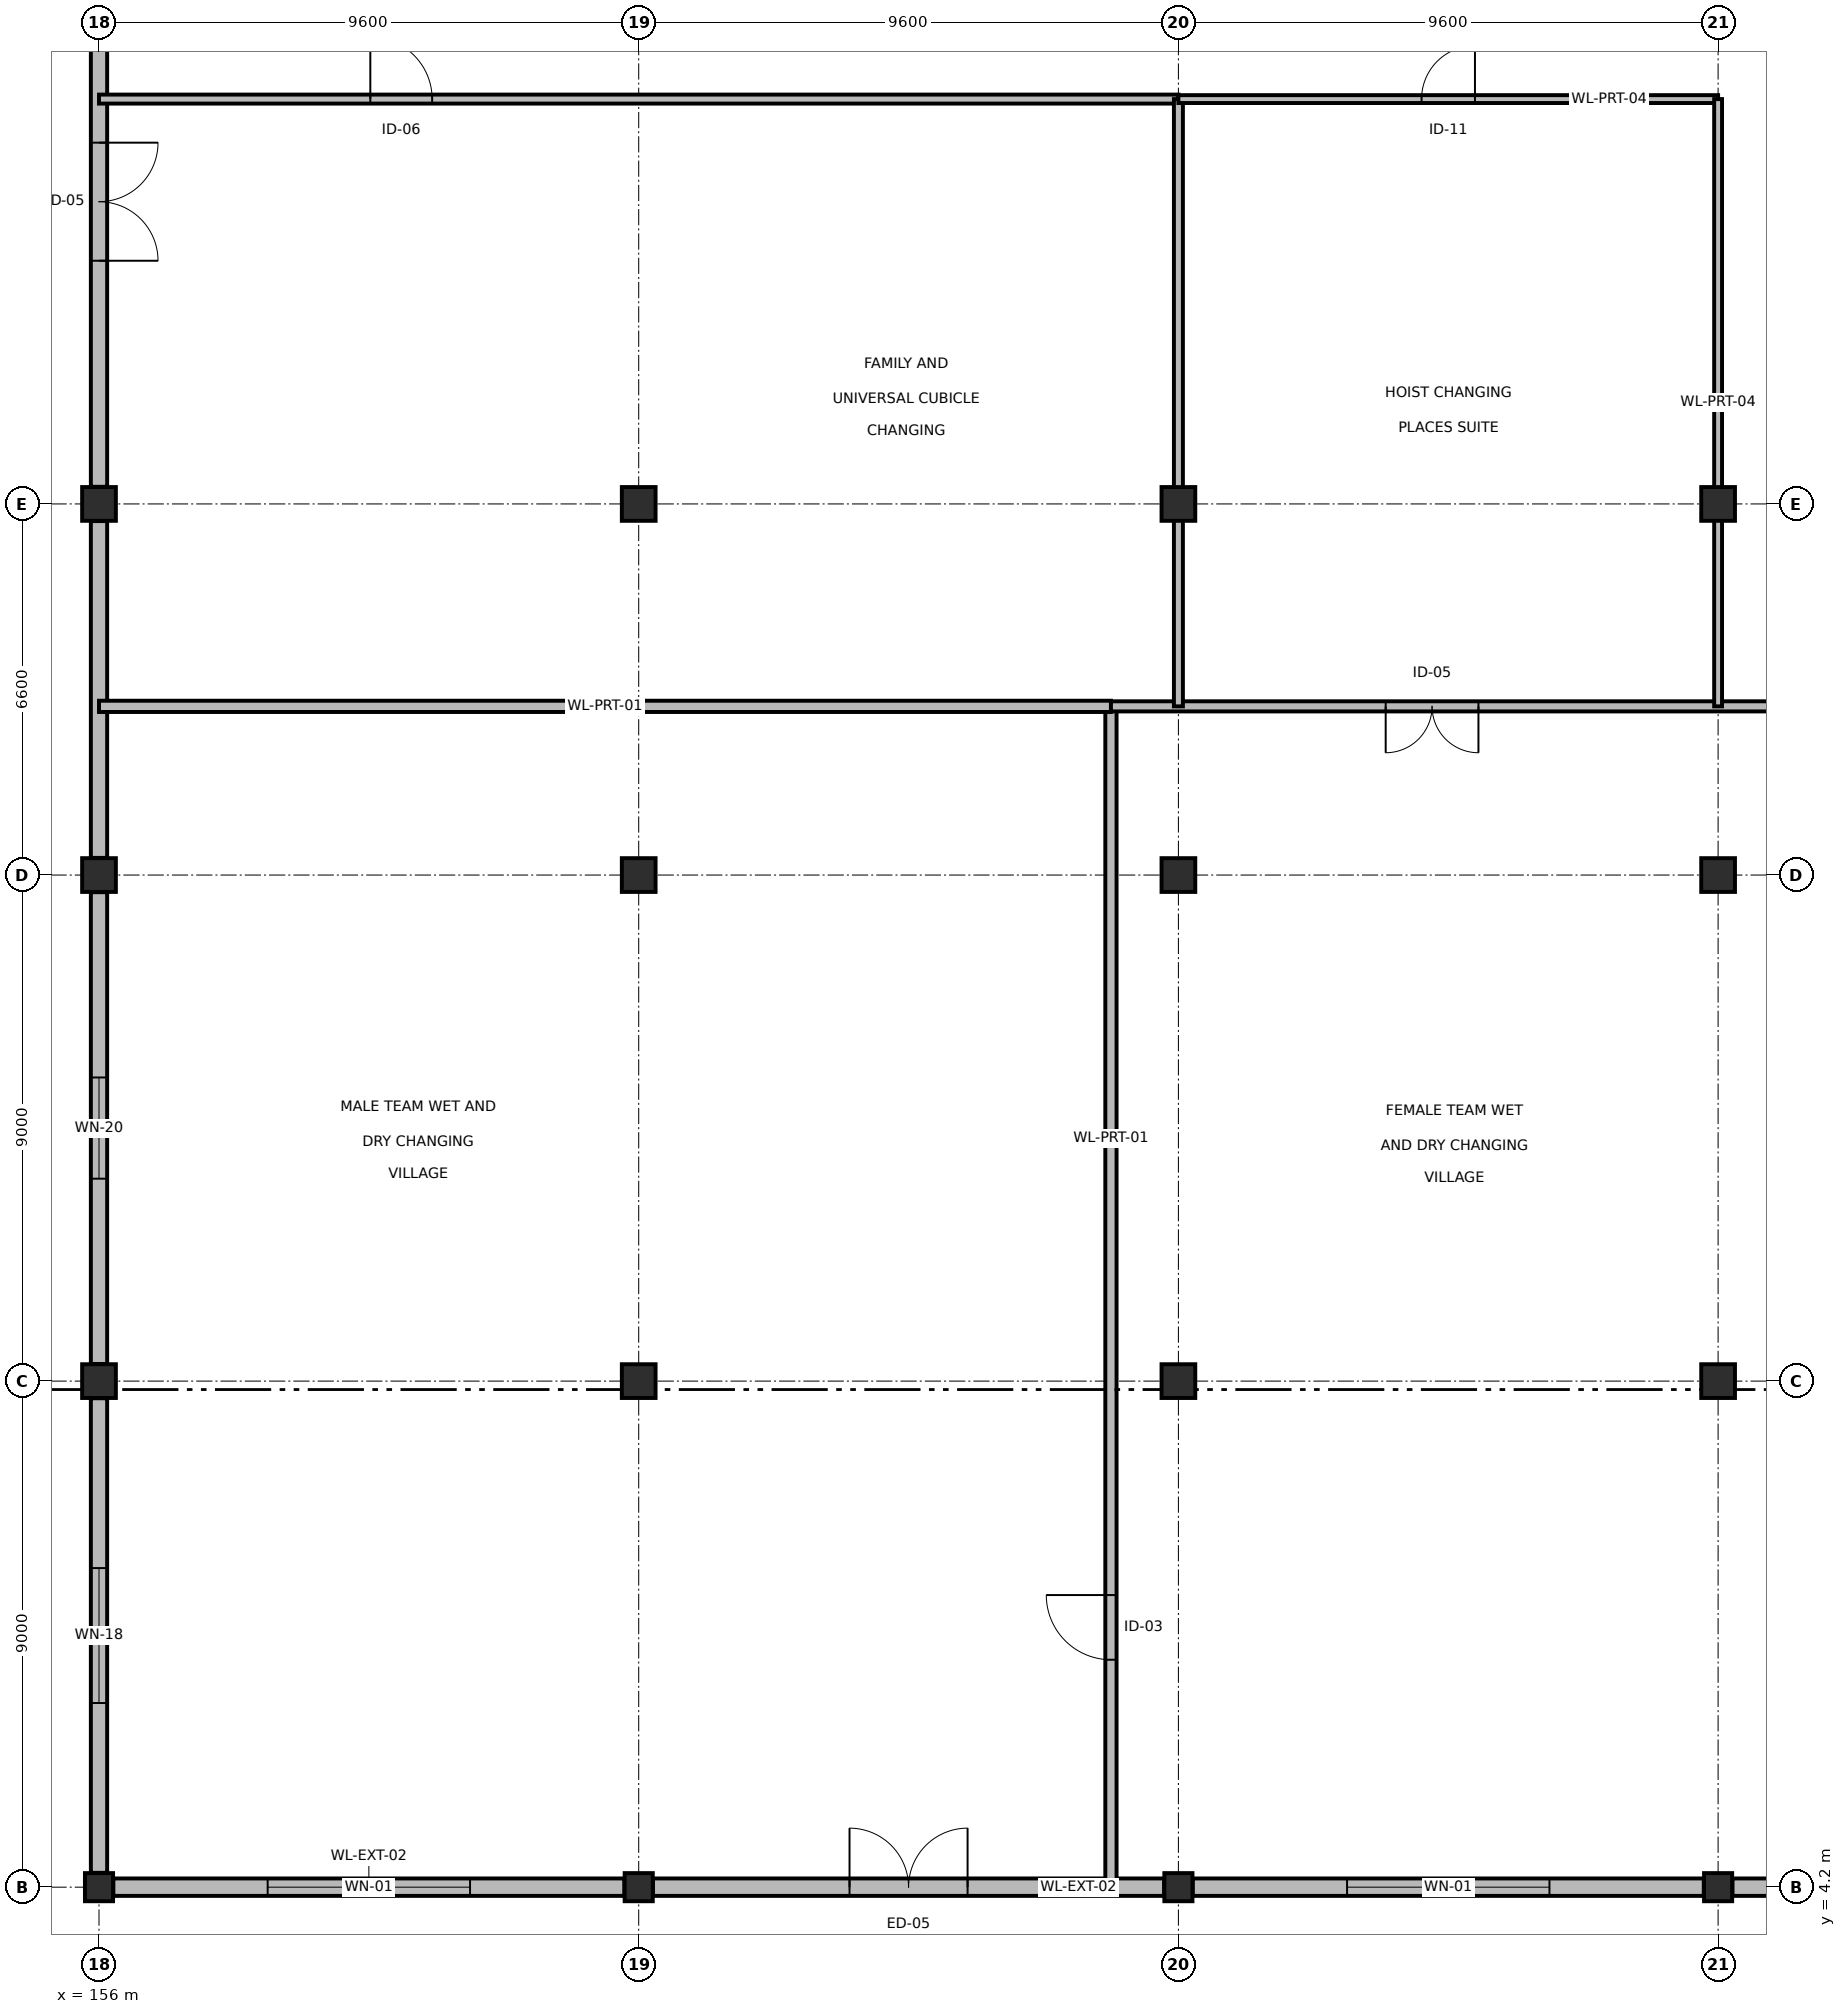
"""IFC4 building model, lengths in metres.
Left out: names, types, materials, properties, quantities, classifications, styles, units other than length and angle.
Written with IfcOpenShell. Run it as: python <this file> out.ifc"""

import sys

from ifc_helpers import new_model, si_unit, direction, frame, frame_2d, origin, origin_2d, place, context, subcontext, project, spatial, rectangle, extrude, element, fill, save


model = new_model("IFC4")
c1 = context("Model", 3, precision=1e-05, world=origin(), true_north=direction((0.0, 1.0)))
c2 = subcontext(c1, "Body", "Model", "MODEL_VIEW")
j1 = project(units=[si_unit("LENGTHUNIT", "METRE"), si_unit("PLANEANGLEUNIT", "RADIAN")], contexts=[c1])
p1 = place(None, origin())
s1 = spatial("IfcSite", under=j1, at=p1, CompositionType="ELEMENT")
p2 = place(p1, origin())
s2 = spatial("IfcBuilding", under=s1, at=p2, CompositionType="ELEMENT")
p3 = place(p2, origin())
s3 = spatial("IfcBuildingStorey", under=s2, at=p3, CompositionType="ELEMENT", Elevation=0.0)
for number, where, z_axis, x_axis in (
    (1, (156.0, 13.2, 0.0), (0.0, 0.0, 1.0), (1.0, 0.0, 0.0)),
    (2, (156.0, 22.2, 0.0), (0.0, 0.0, 1.0), (1.0, 0.0, 0.0)),
    (3, (156.0, 28.8, 0.0), (0.0, 0.0, 1.0), (1.0, 0.0, 0.0)),
    (4, (165.6, 13.2, 0.0), (0.0, 0.0, 1.0), (1.0, 0.0, 0.0)),
    (5, (165.6, 22.2, 0.0), (0.0, 0.0, 1.0), (1.0, 0.0, 0.0)),
    (6, (165.6, 28.8, 0.0), (0.0, 0.0, 1.0), (1.0, 0.0, 0.0)),
    (7, (175.2, 13.2, 0.0), (0.0, 0.0, 1.0), (1.0, 0.0, 0.0)),
    (8, (175.2, 22.2, 0.0), (0.0, 0.0, 1.0), (1.0, 0.0, 0.0)),
    (9, (175.2, 28.8, 0.0), (0.0, 0.0, 1.0), (1.0, 0.0, 0.0)),
    (10, (184.8, 13.2, 0.0), (0.0, 0.0, 1.0), (1.0, 0.0, 0.0)),
    (11, (184.8, 22.2, 0.0), (0.0, 0.0, 1.0), (1.0, 0.0, 0.0)),
    (12, (184.8, 28.8, 0.0), (0.0, 0.0, 1.0), (1.0, 0.0, 0.0)),
):
    element("IfcColumn", number, at=place(p3, frame(where, z_axis=z_axis, x_axis=x_axis)), inside=s3, PredefinedType="COLUMN", context=c2, shape_type="SweptSolid", body=[
        extrude(rectangle(XDim=0.6, YDim=0.6, at=origin_2d()), origin(), (0.0, 0.0, 1.0), 4.8),
    ])
for number, where, z_axis, x_axis in (
    (13, (156.0, 4.2, 0.0), (0.0, 0.0, 1.0), (1.0, 0.0, 0.0)),
    (14, (165.6, 4.2, 0.0), (0.0, 0.0, 1.0), (1.0, 0.0, 0.0)),
    (15, (175.2, 4.2, 0.0), (0.0, 0.0, 1.0), (1.0, 0.0, 0.0)),
    (16, (184.8, 4.2, 0.0), (0.0, 0.0, 1.0), (1.0, 0.0, 0.0)),
):
    element("IfcColumn", number, at=place(p3, frame(where, z_axis=z_axis, x_axis=x_axis)), inside=s3, PredefinedType="COLUMN", context=c2, shape_type="SweptSolid", body=[
        extrude(rectangle(XDim=0.5, YDim=0.5, at=origin_2d()), origin(), (0.0, 0.0, 1.0), 4.8),
    ])
p4 = place(p3, frame((165.345, 4.2, 0.0), z_axis=(0.0, 0.0, 1.0), x_axis=(-1.0, 0.0, 0.0)))
e17 = element("IfcWall", 17, at=p4, inside=s3, PredefinedType="SOLIDWALL", context=c2, shape_type="SweptSolid", body=[
    extrude(rectangle(XDim=9.09, YDim=0.31, at=frame_2d((4.545, 0.0))), origin(), (0.0, 0.0, 1.0), 3.825),
])
p5 = place(p4, frame((2.745, 0.0, 2.2)))
e18 = element("IfcOpeningElement", 18, at=p5, cuts=e17, PredefinedType="OPENING", context=c2, shape_type="SweptSolid", body=[
    extrude(rectangle(XDim=3.6, YDim=0.9, at=frame_2d((1.8, 0.45))), frame((0.0, 0.165, 0.0), z_axis=(0.0, -1.0, 0.0), x_axis=(1.0, 0.0, 0.0)), (0.0, 0.0, 1.0), 0.33),
])
p6 = place(p3, frame((174.945, 4.2, 0.0), z_axis=(0.0, 0.0, 1.0), x_axis=(-1.0, 0.0, 0.0)))
e19 = element("IfcWall", 19, at=p6, inside=s3, PredefinedType="SOLIDWALL", context=c2, shape_type="SweptSolid", body=[
    extrude(rectangle(XDim=9.09, YDim=0.31, at=frame_2d((4.545, 0.0))), origin(), (0.0, 0.0, 1.0), 3.825),
])
p7 = place(p6, frame((3.495, 0.0, 0.0)))
e20 = element("IfcOpeningElement", 20, at=p7, cuts=e19, PredefinedType="OPENING", context=c2, shape_type="SweptSolid", body=[
    extrude(rectangle(XDim=2.1, YDim=2.4, at=frame_2d((1.05, 1.2))), frame((0.0, 0.165, 0.0), z_axis=(0.0, -1.0, 0.0), x_axis=(1.0, 0.0, 0.0)), (0.0, 0.0, 1.0), 0.33),
])
p8 = place(p3, frame((184.545, 4.2, 0.0), z_axis=(0.0, 0.0, 1.0), x_axis=(-1.0, 0.0, 0.0)))
e21 = element("IfcWall", 21, at=p8, inside=s3, PredefinedType="SOLIDWALL", context=c2, shape_type="SweptSolid", body=[
    extrude(rectangle(XDim=9.09, YDim=0.31, at=frame_2d((4.545, 0.0))), origin(), (0.0, 0.0, 1.0), 3.825),
])
p9 = place(p8, frame((2.745, 0.0, 2.2)))
e22 = element("IfcOpeningElement", 22, at=p9, cuts=e21, PredefinedType="OPENING", context=c2, shape_type="SweptSolid", body=[
    extrude(rectangle(XDim=3.6, YDim=0.9, at=frame_2d((1.8, 0.45))), frame((0.0, 0.165, 0.0), z_axis=(0.0, -1.0, 0.0), x_axis=(1.0, 0.0, 0.0)), (0.0, 0.0, 1.0), 0.33),
])
p10 = place(p3, frame((194.145, 4.2, 0.0), z_axis=(0.0, 0.0, 1.0), x_axis=(-1.0, 0.0, 0.0)))
e23 = element("IfcWall", 23, at=p10, inside=s3, PredefinedType="SOLIDWALL", context=c2, shape_type="SweptSolid", body=[
    extrude(rectangle(XDim=9.09, YDim=0.31, at=frame_2d((4.545, 0.0))), origin(), (0.0, 0.0, 1.0), 3.825),
])
p11 = place(p10, frame((3.495, 0.0, 0.0)))
e24 = element("IfcOpeningElement", 24, at=p11, cuts=e23, PredefinedType="OPENING", context=c2, shape_type="SweptSolid", body=[
    extrude(rectangle(XDim=2.1, YDim=2.4, at=frame_2d((1.05, 1.2))), frame((0.0, 0.165, 0.0), z_axis=(0.0, -1.0, 0.0), x_axis=(1.0, 0.0, 0.0)), (0.0, 0.0, 1.0), 0.33),
])
p12 = place(p3, frame((156.0, 4.455, 0.0), z_axis=(0.0, 0.0, 1.0), x_axis=(0.0, 1.0, 0.0)))
e25 = element("IfcWall", 25, at=p12, inside=s3, PredefinedType="SOLIDWALL", context=c2, shape_type="SweptSolid", body=[
    extrude(rectangle(XDim=8.44, YDim=0.29, at=frame_2d((4.22, 0.0))), origin(), (0.0, 0.0, 1.0), 3.825),
])
p13 = place(p12, frame((3.02, 0.0, 0.85)))
e26 = element("IfcOpeningElement", 26, at=p13, cuts=e25, PredefinedType="OPENING", context=c2, shape_type="SweptSolid", body=[
    extrude(rectangle(XDim=2.4, YDim=1.8, at=frame_2d((1.2, 0.9))), frame((0.0, 0.155, 0.0), z_axis=(0.0, -1.0, 0.0), x_axis=(1.0, 0.0, 0.0)), (0.0, 0.0, 1.0), 0.31),
])
p14 = place(p3, frame((156.0, 13.505, 0.0), z_axis=(0.0, 0.0, 1.0), x_axis=(0.0, 1.0, 0.0)))
e27 = element("IfcWall", 27, at=p14, inside=s3, PredefinedType="SOLIDWALL", context=c2, shape_type="SweptSolid", body=[
    extrude(rectangle(XDim=8.39, YDim=0.29, at=frame_2d((4.195, 0.0))), origin(), (0.0, 0.0, 1.0), 3.825),
])
p15 = place(p14, frame((3.295, 0.0, 0.85)))
e28 = element("IfcOpeningElement", 28, at=p15, cuts=e27, PredefinedType="OPENING", context=c2, shape_type="SweptSolid", body=[
    extrude(rectangle(XDim=1.8, YDim=1.8, at=frame_2d((0.9, 0.9))), frame((0.0, 0.155, 0.0), z_axis=(0.0, -1.0, 0.0), x_axis=(1.0, 0.0, 0.0)), (0.0, 0.0, 1.0), 0.31),
])
p16 = place(p3, frame((156.0, 22.505, 0.0), z_axis=(0.0, 0.0, 1.0), x_axis=(0.0, 1.0, 0.0)))
e29 = element("IfcWall", 29, at=p16, inside=s3, PredefinedType="SOLIDWALL", context=c2, shape_type="SweptSolid", body=[
    extrude(rectangle(XDim=5.99, YDim=0.29, at=frame_2d((2.995, 0.0))), origin(), (0.0, 0.0, 1.0), 3.825),
])
p17 = place(p3, frame((156.0, 29.105, 0.0), z_axis=(0.0, 0.0, 1.0), x_axis=(0.0, 1.0, 0.0)))
e30 = element("IfcWall", 30, at=p17, inside=s3, PredefinedType="SOLIDWALL", context=c2, shape_type="SweptSolid", body=[
    extrude(rectangle(XDim=10.14, YDim=0.29, at=frame_2d((5.07, 0.0))), origin(), (0.0, 0.0, 1.0), 3.825),
])
p18 = place(p17, frame((4.02, 0.0, 0.0)))
e31 = element("IfcOpeningElement", 31, at=p18, cuts=e30, PredefinedType="OPENING", context=c2, shape_type="SweptSolid", body=[
    extrude(rectangle(XDim=2.1, YDim=2.4, at=frame_2d((1.05, 1.2))), frame((0.0, 0.155, 0.0), z_axis=(0.0, -1.0, 0.0), x_axis=(1.0, 0.0, 0.0)), (0.0, 0.0, 1.0), 0.31),
])
p19 = place(p3, frame((174.0, 4.2, 0.0), z_axis=(0.0, 0.0, 1.0), x_axis=(0.0, 1.0, 0.0)))
e32 = element("IfcWall", 32, at=p19, inside=s3, PredefinedType="PARTITIONING", context=c2, shape_type="SweptSolid", body=[
    extrude(rectangle(XDim=21.0, YDim=0.2, at=frame_2d((10.5, 0.0))), origin(), (0.0, 0.0, 1.0), 3.825),
])
p20 = place(p19, frame((4.045, 0.0, 0.0)))
e33 = element("IfcOpeningElement", 33, at=p20, cuts=e32, PredefinedType="OPENING", context=c2, shape_type="SweptSolid", body=[
    extrude(rectangle(XDim=1.15, YDim=2.2, at=frame_2d((0.575, 1.1))), frame((0.0, 0.11, 0.0), z_axis=(0.0, -1.0, 0.0), x_axis=(1.0, 0.0, 0.0)), (0.0, 0.0, 1.0), 0.22),
])
p21 = place(p3, frame((156.0, 25.2, 0.0), z_axis=(0.0, 0.0, 1.0), x_axis=(1.0, 0.0, 0.0)))
e34 = element("IfcWall", 34, at=p21, inside=s3, PredefinedType="PARTITIONING", context=c2, shape_type="SweptSolid", body=[
    extrude(rectangle(XDim=18.0, YDim=0.2, at=frame_2d((9.0, 0.0))), origin(), (0.0, 0.0, 1.0), 3.825),
])
p22 = place(p3, frame((174.0, 25.2, 0.0), z_axis=(0.0, 0.0, 1.0), x_axis=(1.0, 0.0, 0.0)))
e35 = element("IfcWall", 35, at=p22, inside=s3, PredefinedType="PARTITIONING", context=c2, shape_type="SweptSolid", body=[
    extrude(rectangle(XDim=20.4, YDim=0.18, at=frame_2d((10.2, 0.0))), origin(), (0.0, 0.0, 1.0), 3.825),
])
p23 = place(p22, frame((4.887, 0.0, 0.0)))
e36 = element("IfcOpeningElement", 36, at=p23, cuts=e35, PredefinedType="OPENING", context=c2, shape_type="SweptSolid", body=[
    extrude(rectangle(XDim=1.65, YDim=2.2, at=frame_2d((0.825, 1.1))), frame((0.0, 0.1, 0.0), z_axis=(0.0, -1.0, 0.0), x_axis=(1.0, 0.0, 0.0)), (0.0, 0.0, 1.0), 0.2),
])
p24 = place(p3, frame((156.0, 36.0, 0.0), z_axis=(0.0, 0.0, 1.0), x_axis=(1.0, 0.0, 0.0)))
e37 = element("IfcWall", 37, at=p24, inside=s3, PredefinedType="PARTITIONING", context=c2, shape_type="SweptSolid", body=[
    extrude(rectangle(XDim=19.2, YDim=0.16, at=frame_2d((9.6, 0.0))), origin(), (0.0, 0.0, 1.0), 3.775),
])
p25 = place(p24, frame((4.826, 0.0, 0.0)))
e38 = element("IfcOpeningElement", 38, at=p25, cuts=e37, PredefinedType="OPENING", context=c2, shape_type="SweptSolid", body=[
    extrude(rectangle(XDim=1.1, YDim=2.15, at=frame_2d((0.55, 1.075))), frame((0.0, 0.09, 0.0), z_axis=(0.0, -1.0, 0.0), x_axis=(1.0, 0.0, 0.0)), (0.0, 0.0, 1.0), 0.18),
])
p26 = place(p3, frame((175.2, 25.2, 0.0), z_axis=(0.0, 0.0, 1.0), x_axis=(0.0, 1.0, 0.0)))
e39 = element("IfcWall", 39, at=p26, inside=s3, PredefinedType="PARTITIONING", context=c2, shape_type="SweptSolid", body=[
    extrude(rectangle(XDim=10.8, YDim=0.16, at=frame_2d((5.4, 0.0))), origin(), (0.0, 0.0, 1.0), 3.775),
])
p27 = place(p3, frame((175.2, 36.0, 0.0), z_axis=(0.0, 0.0, 1.0), x_axis=(1.0, 0.0, 0.0)))
e40 = element("IfcWall", 40, at=p27, inside=s3, PredefinedType="PARTITIONING", context=c2, shape_type="SweptSolid", body=[
    extrude(rectangle(XDim=9.6, YDim=0.14, at=frame_2d((4.8, 0.0))), origin(), (0.0, 0.0, 1.0), 3.775),
])
p28 = place(p27, frame((4.325, 0.0, 0.0)))
e41 = element("IfcOpeningElement", 41, at=p28, cuts=e40, PredefinedType="OPENING", context=c2, shape_type="SweptSolid", body=[
    extrude(rectangle(XDim=0.95, YDim=2.1, at=frame_2d((0.475, 1.05))), frame((0.0, 0.08, 0.0), z_axis=(0.0, -1.0, 0.0), x_axis=(1.0, 0.0, 0.0)), (0.0, 0.0, 1.0), 0.16),
])
p29 = place(p3, frame((184.8, 25.2, 0.0), z_axis=(0.0, 0.0, 1.0), x_axis=(0.0, 1.0, 0.0)))
e42 = element("IfcWall", 42, at=p29, inside=s3, PredefinedType="PARTITIONING", context=c2, shape_type="SweptSolid", body=[
    extrude(rectangle(XDim=10.8, YDim=0.14, at=frame_2d((5.4, 0.0))), origin(), (0.0, 0.0, 1.0), 3.775),
])
p30 = place(p5, origin())
e43 = element("IfcWindow", 43, at=p30, inside=s3, PartitioningType="SINGLE_PANEL", PredefinedType="WINDOW", context=c2, shape_type="SweptSolid", body=[
    extrude(rectangle(XDim=3.6, YDim=0.9, at=frame_2d((1.8, 0.45))), frame((0.0, 0.03, 0.0), z_axis=(0.0, -1.0, 0.0), x_axis=(1.0, 0.0, 0.0)), (0.0, 0.0, 1.0), 0.06),
])
fill(e18, e43)
p31 = place(p7, origin())
e44 = element("IfcDoor", 44, at=p31, inside=s3, OperationType="DOUBLE_DOOR_SINGLE_SWING", PredefinedType="DOOR", context=c2, shape_type="SweptSolid", body=[
    extrude(rectangle(XDim=2.1, YDim=2.4, at=frame_2d((1.05, 1.2))), frame((0.0, 0.025, 0.0), z_axis=(0.0, -1.0, 0.0), x_axis=(1.0, 0.0, 0.0)), (0.0, 0.0, 1.0), 0.05),
])
fill(e20, e44)
p32 = place(p9, origin())
e45 = element("IfcWindow", 45, at=p32, inside=s3, PartitioningType="SINGLE_PANEL", PredefinedType="WINDOW", context=c2, shape_type="SweptSolid", body=[
    extrude(rectangle(XDim=3.6, YDim=0.9, at=frame_2d((1.8, 0.45))), frame((0.0, 0.03, 0.0), z_axis=(0.0, -1.0, 0.0), x_axis=(1.0, 0.0, 0.0)), (0.0, 0.0, 1.0), 0.06),
])
fill(e22, e45)
p33 = place(p13, origin())
e46 = element("IfcWindow", 46, at=p33, inside=s3, PartitioningType="SINGLE_PANEL", PredefinedType="WINDOW", context=c2, shape_type="SweptSolid", body=[
    extrude(rectangle(XDim=2.4, YDim=1.8, at=frame_2d((1.2, 0.9))), frame((0.0, 0.03, 0.0), z_axis=(0.0, -1.0, 0.0), x_axis=(1.0, 0.0, 0.0)), (0.0, 0.0, 1.0), 0.06),
])
fill(e26, e46)
p34 = place(p15, origin())
e47 = element("IfcWindow", 47, at=p34, inside=s3, PartitioningType="SINGLE_PANEL", PredefinedType="WINDOW", context=c2, shape_type="SweptSolid", body=[
    extrude(rectangle(XDim=1.8, YDim=1.8, at=frame_2d((0.9, 0.9))), frame((0.0, 0.03, 0.0), z_axis=(0.0, -1.0, 0.0), x_axis=(1.0, 0.0, 0.0)), (0.0, 0.0, 1.0), 0.06),
])
fill(e28, e47)
p35 = place(p18, origin())
e48 = element("IfcDoor", 48, at=p35, inside=s3, OperationType="DOUBLE_DOOR_SINGLE_SWING", PredefinedType="DOOR", context=c2, shape_type="SweptSolid", body=[
    extrude(rectangle(XDim=2.1, YDim=2.4, at=frame_2d((1.05, 1.2))), frame((0.0, 0.025, 0.0), z_axis=(0.0, -1.0, 0.0), x_axis=(1.0, 0.0, 0.0)), (0.0, 0.0, 1.0), 0.05),
])
fill(e31, e48)
p36 = place(p20, origin())
e49 = element("IfcDoor", 49, at=p36, inside=s3, OperationType="SINGLE_SWING_RIGHT", PredefinedType="DOOR", context=c2, shape_type="SweptSolid", body=[
    extrude(rectangle(XDim=1.15, YDim=2.2, at=frame_2d((0.575, 1.1))), frame((0.0, 0.025, 0.0), z_axis=(0.0, -1.0, 0.0), x_axis=(1.0, 0.0, 0.0)), (0.0, 0.0, 1.0), 0.05),
])
fill(e33, e49)
p37 = place(p23, origin())
e50 = element("IfcDoor", 50, at=p37, inside=s3, OperationType="DOUBLE_DOOR_SINGLE_SWING", PredefinedType="DOOR", context=c2, shape_type="SweptSolid", body=[
    extrude(rectangle(XDim=1.65, YDim=2.2, at=frame_2d((0.825, 1.1))), frame((0.0, 0.025, 0.0), z_axis=(0.0, -1.0, 0.0), x_axis=(1.0, 0.0, 0.0)), (0.0, 0.0, 1.0), 0.05),
])
fill(e36, e50)
p38 = place(p25, origin())
e51 = element("IfcDoor", 51, at=p38, inside=s3, OperationType="SINGLE_SWING_LEFT", PredefinedType="DOOR", context=c2, shape_type="SweptSolid", body=[
    extrude(rectangle(XDim=1.1, YDim=2.15, at=frame_2d((0.55, 1.075))), frame((0.0, 0.025, 0.0), z_axis=(0.0, -1.0, 0.0), x_axis=(1.0, 0.0, 0.0)), (0.0, 0.0, 1.0), 0.05),
])
fill(e38, e51)
p39 = place(p28, origin())
e52 = element("IfcDoor", 52, at=p39, inside=s3, OperationType="SINGLE_SWING_RIGHT", PredefinedType="DOOR", context=c2, shape_type="SweptSolid", body=[
    extrude(rectangle(XDim=0.95, YDim=2.1, at=frame_2d((0.475, 1.05))), frame((0.0, 0.025, 0.0), z_axis=(0.0, -1.0, 0.0), x_axis=(1.0, 0.0, 0.0)), (0.0, 0.0, 1.0), 0.05),
])
fill(e41, e52)
save(model, sys.argv[1])
